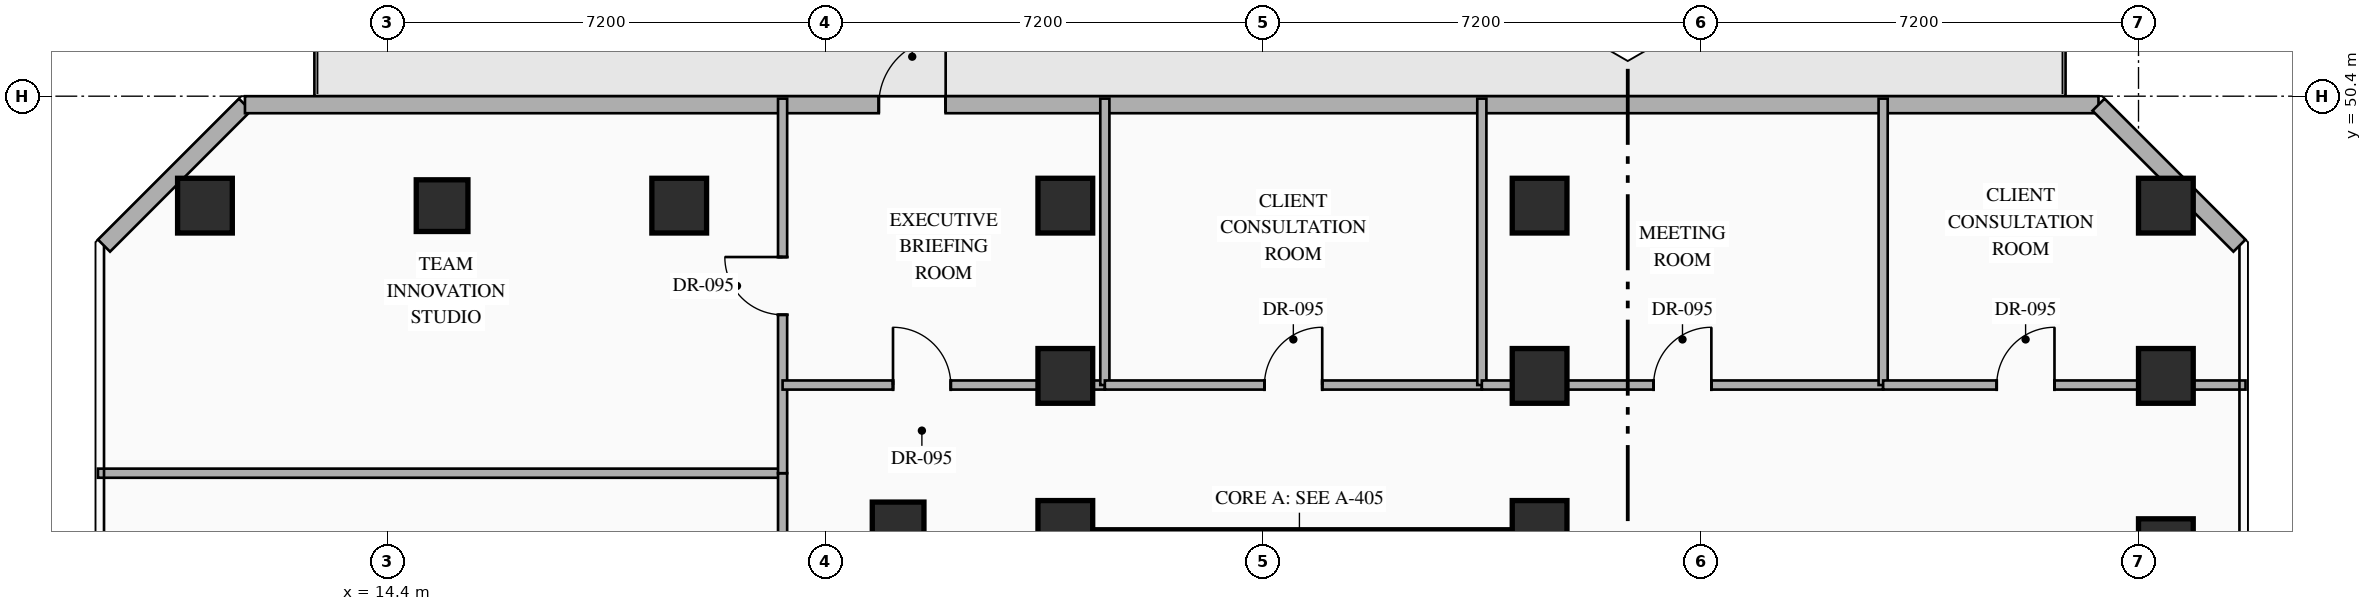
"""IFC4 building model, lengths in metres.
Left out: names, types, materials, properties, quantities, classifications, styles, units other than length and angle.
Written with IfcOpenShell. Run it as: python <this file> out.ifc"""

import sys

from ifc_helpers import new_model, si_unit, direction, frame, frame_2d, origin, origin_2d, place, context, subcontext, project, spatial, rectangle, hollow_rectangle, extrude, element, fill, save


model = new_model("IFC4")
c1 = context("Model", 3, precision=1e-05, world=origin(), true_north=direction((0.0, 1.0)))
c2 = subcontext(c1, "Body", "Model", "MODEL_VIEW")
j1 = project(units=[si_unit("LENGTHUNIT", "METRE"), si_unit("PLANEANGLEUNIT", "RADIAN")], contexts=[c1])
p1 = place(None, origin())
s1 = spatial("IfcSite", under=j1, at=p1, CompositionType="ELEMENT")
p2 = place(p1, origin())
s2 = spatial("IfcBuilding", under=s1, at=p2, CompositionType="ELEMENT")
p3 = place(p2, frame((0.0, 0.0, 122.85)))
s3 = spatial("IfcBuildingStorey", under=s2, at=p3, CompositionType="ELEMENT", Elevation=122.85)
p4 = place(p3, frame((25.62, 42.97, 0.0), z_axis=(0.0, 0.0, 1.0), x_axis=(1.0, 0.0, 0.0)))
e1 = element("IfcWall", 1, at=p4, inside=s3, PredefinedType="SHEAR", context=c2, shape_type="SweptSolid", body=[
    extrude(rectangle(XDim=7.78, YDim=0.6, at=frame_2d((3.89, 0.0))), origin(), (0.0, 0.0, 1.0), 3.6),
])
for number, where, z_axis, x_axis in (
    (2, (25.55, 43.3, 0.0), (0.0, 0.0, 1.0), (1.0, 0.0, 0.0)),
    (3, (33.35, 43.3, 0.0), (0.0, 0.0, 1.0), (1.0, 0.0, 0.0)),
    (4, (43.65, 43.0, 0.0), (0.0, 0.0, 1.0), (1.0, 0.0, 0.0)),
):
    element("IfcColumn", number, at=place(p3, frame(where, z_axis=z_axis, x_axis=x_axis)), inside=s3, PredefinedType="COLUMN", context=c2, shape_type="SweptSolid", body=[
        extrude(rectangle(XDim=0.9, YDim=0.9, at=origin_2d()), origin(), (0.0, 0.0, 1.0), 3.6),
    ])
for number, where, z_axis, x_axis in (
    (5, (25.55, 45.8, 0.0), (0.0, 0.0, 1.0), (1.0, 0.0, 0.0)),
    (6, (33.35, 45.8, 0.0), (0.0, 0.0, 1.0), (1.0, 0.0, 0.0)),
    (7, (43.65, 45.8, 0.0), (0.0, 0.0, 1.0), (1.0, 0.0, 0.0)),
    (8, (11.4, 48.6, 0.0), (0.0, 0.0, 1.0), (1.0, 0.0, 0.0)),
    (9, (19.2, 48.6, 0.0), (0.0, 0.0, 1.0), (1.0, 0.0, 0.0)),
    (10, (25.55, 48.6, 0.0), (0.0, 0.0, 1.0), (1.0, 0.0, 0.0)),
    (11, (33.35, 48.6, 0.0), (0.0, 0.0, 1.0), (1.0, 0.0, 0.0)),
    (12, (43.65, 48.6, 0.0), (0.0, 0.0, 1.0), (1.0, 0.0, 0.0)),
):
    element("IfcColumn", number, at=place(p3, frame(where, z_axis=z_axis, x_axis=x_axis)), inside=s3, PredefinedType="COLUMN", context=c2, shape_type="SweptSolid", body=[
        extrude(hollow_rectangle(XDim=0.9, YDim=0.9, WallThickness=0.036, at=origin_2d()), origin(), (0.0, 0.0, 1.0), 3.6),
    ])
for number, where, z_axis, x_axis in (
    (13, (22.8, 43.3, 0.0), (0.0, 0.0, 1.0), (1.0, 0.0, 0.0)),
    (14, (15.3, 48.6, 0.0), (0.0, 0.0, 1.0), (1.0, 0.0, 0.0)),
):
    element("IfcColumn", number, at=place(p3, frame(where, z_axis=z_axis, x_axis=x_axis)), inside=s3, PredefinedType="COLUMN", context=c2, shape_type="SweptSolid", body=[
        extrude(hollow_rectangle(XDim=0.85, YDim=0.85, WallThickness=0.032, at=origin_2d()), origin(), (0.0, 0.0, 1.0), 3.6),
    ])
p5 = place(p3, frame((9.74, 47.942, 0.0), z_axis=(0.0, 0.0, 1.0), x_axis=(0.707106781187, 0.707106781187, 0.0)))
e15 = element("IfcWall", 15, at=p5, inside=s3, PredefinedType="STANDARD", context=c2, shape_type="SweptSolid", body=[
    extrude(rectangle(XDim=3.278, YDim=0.28, at=frame_2d((1.639, 0.0))), origin(), (0.0, 0.0, 1.0), 3.35),
])
p6 = place(p3, frame((12.058, 50.26, 0.0), z_axis=(0.0, 0.0, 1.0), x_axis=(1.0, 0.0, 0.0)))
e16 = element("IfcWall", 16, at=p6, inside=s3, PredefinedType="STANDARD", context=c2, shape_type="SweptSolid", body=[
    extrude(rectangle(XDim=30.484, YDim=0.28, at=frame_2d((15.242, 0.0))), origin(), (0.0, 0.0, 1.0), 3.35),
])
p7 = place(p6, frame((10.424, 0.0, 0.0)))
e17 = element("IfcOpeningElement", 17, at=p7, cuts=e16, PredefinedType="OPENING", context=c2, shape_type="SweptSolid", body=[
    extrude(rectangle(XDim=1.1, YDim=2.2, at=frame_2d((0.55, 1.1))), frame((0.0, 0.15, 0.0), z_axis=(0.0, -1.0, 0.0), x_axis=(1.0, 0.0, 0.0)), (0.0, 0.0, 1.0), 0.3),
])
p8 = place(p3, frame((42.542, 50.26, 0.0), z_axis=(0.0, 0.0, 1.0), x_axis=(0.707106781187, -0.707106781187, 0.0)))
e18 = element("IfcWall", 18, at=p8, inside=s3, PredefinedType="STANDARD", context=c2, shape_type="SweptSolid", body=[
    extrude(rectangle(XDim=3.278, YDim=0.28, at=frame_2d((1.639, 0.0))), origin(), (0.0, 0.0, 1.0), 3.35),
])
p9 = place(p3, frame((9.64, 44.2, 0.0), z_axis=(0.0, 0.0, 1.0), x_axis=(1.0, 0.0, 0.0)))
e19 = element("IfcWall", 19, at=p9, inside=s3, PredefinedType="PARTITIONING", context=c2, shape_type="SweptSolid", body=[
    extrude(rectangle(XDim=11.26, YDim=0.15, at=frame_2d((5.63, 0.0))), origin(), (0.0, 0.0, 1.0), 3.35),
])
p10 = place(p3, frame((20.9, 37.6, 0.0), z_axis=(0.0, 0.0, 1.0), x_axis=(0.0, 1.0, 0.0)))
e20 = element("IfcWall", 20, at=p10, inside=s3, PredefinedType="PARTITIONING", context=c2, shape_type="SweptSolid", body=[
    extrude(rectangle(XDim=6.6, YDim=0.15, at=frame_2d((3.3, 0.0))), origin(), (0.0, 0.0, 1.0), 3.35),
])
p11 = place(p10, frame((3.314, 0.0, 0.0)))
e21 = element("IfcOpeningElement", 21, at=p11, cuts=e20, PredefinedType="OPENING", context=c2, shape_type="SweptSolid", body=[
    extrude(rectangle(XDim=0.95, YDim=2.15, at=frame_2d((0.475, 1.075))), frame((0.0, 0.085, 0.0), z_axis=(0.0, -1.0, 0.0), x_axis=(1.0, 0.0, 0.0)), (0.0, 0.0, 1.0), 0.17),
])
p12 = place(p3, frame((20.9, 44.2, 0.0), z_axis=(0.0, 0.0, 1.0), x_axis=(0.0, 1.0, 0.0)))
e22 = element("IfcWall", 22, at=p12, inside=s3, PredefinedType="PARTITIONING", context=c2, shape_type="SweptSolid", body=[
    extrude(rectangle(XDim=6.16, YDim=0.15, at=frame_2d((3.08, 0.0))), origin(), (0.0, 0.0, 1.0), 3.35),
])
p13 = place(p12, frame((2.605, 0.0, 0.0)))
e23 = element("IfcOpeningElement", 23, at=p13, cuts=e22, PredefinedType="OPENING", context=c2, shape_type="SweptSolid", body=[
    extrude(rectangle(XDim=0.95, YDim=2.15, at=frame_2d((0.475, 1.075))), frame((0.0, 0.085, 0.0), z_axis=(0.0, -1.0, 0.0), x_axis=(1.0, 0.0, 0.0)), (0.0, 0.0, 1.0), 0.17),
])
p14 = place(p3, frame((20.9, 45.65, 0.0), z_axis=(0.0, 0.0, 1.0), x_axis=(1.0, 0.0, 0.0)))
e24 = element("IfcWall", 24, at=p14, inside=s3, PredefinedType="PARTITIONING", context=c2, shape_type="SweptSolid", body=[
    extrude(rectangle(XDim=5.3, YDim=0.15, at=frame_2d((2.65, 0.0))), origin(), (0.0, 0.0, 1.0), 2.695),
])
p15 = place(p14, frame((1.816, 0.0, 0.0)))
e25 = element("IfcOpeningElement", 25, at=p15, cuts=e24, PredefinedType="OPENING", context=c2, shape_type="SweptSolid", body=[
    extrude(rectangle(XDim=0.95, YDim=2.15, at=frame_2d((0.475, 1.075))), frame((0.0, 0.085, 0.0), z_axis=(0.0, -1.0, 0.0), x_axis=(1.0, 0.0, 0.0)), (0.0, 0.0, 1.0), 0.17),
])
p16 = place(p3, frame((26.2, 45.65, 0.0), z_axis=(0.0, 0.0, 1.0), x_axis=(0.0, 1.0, 0.0)))
e26 = element("IfcWall", 26, at=p16, inside=s3, PredefinedType="PARTITIONING", context=c2, shape_type="SweptSolid", body=[
    extrude(rectangle(XDim=4.71, YDim=0.15, at=frame_2d((2.355, 0.0))), origin(), (0.0, 0.0, 1.0), 3.35),
])
p17 = place(p3, frame((26.2, 45.65, 0.0), z_axis=(0.0, 0.0, 1.0), x_axis=(1.0, 0.0, 0.0)))
e27 = element("IfcWall", 27, at=p17, inside=s3, PredefinedType="PARTITIONING", context=c2, shape_type="SweptSolid", body=[
    extrude(rectangle(XDim=6.2, YDim=0.15, at=frame_2d((3.1, 0.0))), origin(), (0.0, 0.0, 1.0), 2.695),
])
p18 = place(p17, frame((2.625, 0.0, 0.0)))
e28 = element("IfcOpeningElement", 28, at=p18, cuts=e27, PredefinedType="OPENING", context=c2, shape_type="SweptSolid", body=[
    extrude(rectangle(XDim=0.95, YDim=2.15, at=frame_2d((0.475, 1.075))), frame((0.0, 0.085, 0.0), z_axis=(0.0, -1.0, 0.0), x_axis=(1.0, 0.0, 0.0)), (0.0, 0.0, 1.0), 0.17),
])
p19 = place(p3, frame((32.4, 45.65, 0.0), z_axis=(0.0, 0.0, 1.0), x_axis=(0.0, 1.0, 0.0)))
e29 = element("IfcWall", 29, at=p19, inside=s3, PredefinedType="PARTITIONING", context=c2, shape_type="SweptSolid", body=[
    extrude(rectangle(XDim=4.71, YDim=0.15, at=frame_2d((2.355, 0.0))), origin(), (0.0, 0.0, 1.0), 3.35),
])
p20 = place(p3, frame((32.4, 45.65, 0.0), z_axis=(0.0, 0.0, 1.0), x_axis=(1.0, 0.0, 0.0)))
e30 = element("IfcWall", 30, at=p20, inside=s3, PredefinedType="PARTITIONING", context=c2, shape_type="SweptSolid", body=[
    extrude(rectangle(XDim=6.6, YDim=0.15, at=frame_2d((3.3, 0.0))), origin(), (0.0, 0.0, 1.0), 2.695),
])
p21 = place(p20, frame((2.825, 0.0, 0.0)))
e31 = element("IfcOpeningElement", 31, at=p21, cuts=e30, PredefinedType="OPENING", context=c2, shape_type="SweptSolid", body=[
    extrude(rectangle(XDim=0.95, YDim=2.15, at=frame_2d((0.475, 1.075))), frame((0.0, 0.085, 0.0), z_axis=(0.0, -1.0, 0.0), x_axis=(1.0, 0.0, 0.0)), (0.0, 0.0, 1.0), 0.17),
])
p22 = place(p3, frame((39.0, 45.65, 0.0), z_axis=(0.0, 0.0, 1.0), x_axis=(0.0, 1.0, 0.0)))
e32 = element("IfcWall", 32, at=p22, inside=s3, PredefinedType="PARTITIONING", context=c2, shape_type="SweptSolid", body=[
    extrude(rectangle(XDim=4.71, YDim=0.15, at=frame_2d((2.355, 0.0))), origin(), (0.0, 0.0, 1.0), 3.35),
])
p23 = place(p3, frame((39.0, 45.65, 0.0), z_axis=(0.0, 0.0, 1.0), x_axis=(1.0, 0.0, 0.0)))
e33 = element("IfcWall", 33, at=p23, inside=s3, PredefinedType="PARTITIONING", context=c2, shape_type="SweptSolid", body=[
    extrude(rectangle(XDim=5.96, YDim=0.15, at=frame_2d((2.98, 0.0))), origin(), (0.0, 0.0, 1.0), 2.695),
])
p24 = place(p23, frame((1.868, 0.0, 0.0)))
e34 = element("IfcOpeningElement", 34, at=p24, cuts=e33, PredefinedType="OPENING", context=c2, shape_type="SweptSolid", body=[
    extrude(rectangle(XDim=0.95, YDim=2.15, at=frame_2d((0.475, 1.075))), frame((0.0, 0.085, 0.0), z_axis=(0.0, -1.0, 0.0), x_axis=(1.0, 0.0, 0.0)), (0.0, 0.0, 1.0), 0.17),
])
p25 = place(p7, origin())
e35 = element("IfcDoor", 35, at=p25, inside=s3, OperationType="SINGLE_SWING_RIGHT", PredefinedType="DOOR", context=c2, shape_type="SweptSolid", body=[
    extrude(rectangle(XDim=1.1, YDim=2.2, at=frame_2d((0.55, 1.1))), frame((0.0, 0.025, 0.0), z_axis=(0.0, -1.0, 0.0), x_axis=(1.0, 0.0, 0.0)), (0.0, 0.0, 1.0), 0.05),
])
fill(e17, e35)
p26 = place(p13, origin())
e36 = element("IfcDoor", 36, at=p26, inside=s3, OperationType="SINGLE_SWING_RIGHT", PredefinedType="DOOR", context=c2, shape_type="SweptSolid", body=[
    extrude(rectangle(XDim=0.95, YDim=2.15, at=frame_2d((0.475, 1.075))), frame((0.0, 0.025, 0.0), z_axis=(0.0, -1.0, 0.0), x_axis=(1.0, 0.0, 0.0)), (0.0, 0.0, 1.0), 0.05),
])
fill(e23, e36)
p27 = place(p15, origin())
e37 = element("IfcDoor", 37, at=p27, inside=s3, OperationType="SINGLE_SWING_LEFT", PredefinedType="DOOR", context=c2, shape_type="SweptSolid", body=[
    extrude(rectangle(XDim=0.95, YDim=2.15, at=frame_2d((0.475, 1.075))), frame((0.0, 0.025, 0.0), z_axis=(0.0, -1.0, 0.0), x_axis=(1.0, 0.0, 0.0)), (0.0, 0.0, 1.0), 0.05),
])
fill(e25, e37)
p28 = place(p18, origin())
e38 = element("IfcDoor", 38, at=p28, inside=s3, OperationType="SINGLE_SWING_RIGHT", PredefinedType="DOOR", context=c2, shape_type="SweptSolid", body=[
    extrude(rectangle(XDim=0.95, YDim=2.15, at=frame_2d((0.475, 1.075))), frame((0.0, 0.025, 0.0), z_axis=(0.0, -1.0, 0.0), x_axis=(1.0, 0.0, 0.0)), (0.0, 0.0, 1.0), 0.05),
])
fill(e28, e38)
p29 = place(p21, origin())
e39 = element("IfcDoor", 39, at=p29, inside=s3, OperationType="SINGLE_SWING_RIGHT", PredefinedType="DOOR", context=c2, shape_type="SweptSolid", body=[
    extrude(rectangle(XDim=0.95, YDim=2.15, at=frame_2d((0.475, 1.075))), frame((0.0, 0.025, 0.0), z_axis=(0.0, -1.0, 0.0), x_axis=(1.0, 0.0, 0.0)), (0.0, 0.0, 1.0), 0.05),
])
fill(e31, e39)
p30 = place(p24, origin())
e40 = element("IfcDoor", 40, at=p30, inside=s3, OperationType="SINGLE_SWING_RIGHT", PredefinedType="DOOR", context=c2, shape_type="SweptSolid", body=[
    extrude(rectangle(XDim=0.95, YDim=2.15, at=frame_2d((0.475, 1.075))), frame((0.0, 0.025, 0.0), z_axis=(0.0, -1.0, 0.0), x_axis=(1.0, 0.0, 0.0)), (0.0, 0.0, 1.0), 0.05),
])
fill(e34, e40)
save(model, sys.argv[1])
